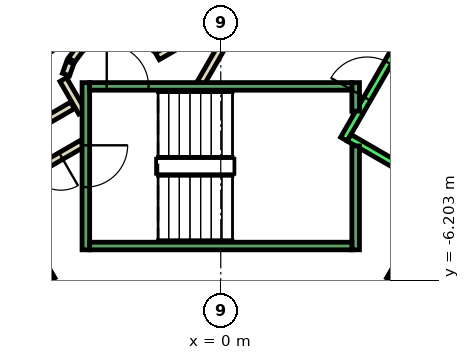
"""IFC4 building model, lengths in metres.
Left out: names, types, materials, properties, quantities, classifications, styles, units other than length and angle.
Written with IfcOpenShell. Run it as: python <this file> out.ifc"""

import sys

from ifc_helpers import new_model, si_unit, direction, frame, frame_2d, origin, place, context, subcontext, project, spatial, rectangle, extrude, element, fill, save


model = new_model("IFC4")
c1 = context("Model", 3, precision=1e-05, world=origin(), true_north=direction((0.0, 1.0)))
c2 = subcontext(c1, "Body", "Model", "MODEL_VIEW")
j1 = project(units=[si_unit("LENGTHUNIT", "METRE"), si_unit("PLANEANGLEUNIT", "RADIAN")], contexts=[c1])
p1 = place(None, origin())
s1 = spatial("IfcSite", under=j1, at=p1, CompositionType="ELEMENT")
p2 = place(p1, origin())
s2 = spatial("IfcBuilding", under=s1, at=p2, CompositionType="ELEMENT")
p3 = place(p2, frame((0.0, 0.0, 15.0)))
s3 = spatial("IfcBuildingStorey", under=s2, at=p3, CompositionType="ELEMENT", Elevation=15.0)
p4 = place(p3, frame((-3.9, -1.599, 0.0), z_axis=(0.0, 0.0, 1.0), x_axis=(-0.865969445389, -0.500096910261, 0.0)))
e1 = element("IfcWall", 1, at=p4, inside=s3, PredefinedType="PARTITIONING", context=c2, shape_type="SweptSolid", body=[
    extrude(rectangle(XDim=1.373, YDim=0.2, at=frame_2d((0.687, 0.0))), origin(), (0.0, 0.0, 1.0), 4.55),
])
p5 = place(p3, frame((-4.145, -0.92, 0.0), z_axis=(0.0, 0.0, 1.0), x_axis=(0.499743786207, -0.866173278362, 0.0)))
e2 = element("IfcWall", 2, at=p5, inside=s3, PredefinedType="PARTITIONING", context=c2, shape_type="SweptSolid", body=[
    extrude(rectangle(XDim=0.991, YDim=0.2, at=frame_2d((0.495, 0.0))), origin(), (0.0, 0.0, 1.0), 4.55),
])
p6 = place(p3, frame((-3.65, -2.61, 0.0), z_axis=(0.0, 0.0, 1.0), x_axis=(-0.866072462134, -0.499918483688, 0.0)))
e3 = element("IfcWall", 3, at=p6, inside=s3, PredefinedType="PARTITIONING", context=c2, shape_type="SweptSolid", body=[
    extrude(rectangle(XDim=2.084, YDim=0.2, at=frame_2d((1.042, 0.0))), origin(), (0.0, 0.0, 1.0), 4.55),
])
p7 = place(p6, frame((0.642, 0.0, 0.0)))
e4 = element("IfcOpeningElement", 4, at=p7, cuts=e3, PredefinedType="OPENING", context=c2, shape_type="SweptSolid", body=[
    extrude(rectangle(XDim=0.9, YDim=2.1, at=frame_2d((0.45, 1.05))), frame((0.0, 0.11, 0.0), z_axis=(0.0, -1.0, 0.0), x_axis=(1.0, 0.0, 0.0)), (0.0, 0.0, 1.0), 0.22),
])
p8 = place(p3, frame((-0.52, -1.0, 0.0), z_axis=(0.0, 0.0, 1.0), x_axis=(0.50011622646, 0.865958290007, 0.0)))
e5 = element("IfcWall", 5, at=p8, inside=s3, PredefinedType="PARTITIONING", context=c2, shape_type="SweptSolid", body=[
    extrude(rectangle(XDim=4.991, YDim=0.2, at=frame_2d((2.496, 0.0))), origin(), (0.0, 0.0, 1.0), 4.55),
])
p9 = place(p8, frame((1.945, 0.0, 0.0)))
e6 = element("IfcOpeningElement", 6, at=p9, cuts=e5, PredefinedType="OPENING", context=c2, shape_type="SweptSolid", body=[
    extrude(rectangle(XDim=1.0, YDim=2.1, at=frame_2d((0.5, 1.05))), frame((0.0, 0.11, 0.0), z_axis=(0.0, -1.0, 0.0), x_axis=(1.0, 0.0, 0.0)), (0.0, 0.0, 1.0), 0.22),
])
p10 = place(p3, frame((-0.412, 0.414, 0.0), z_axis=(0.0, 0.0, 1.0), x_axis=(-0.866017369001, -0.500013916395, 0.0)))
e7 = element("IfcWall", 7, at=p10, inside=s3, PredefinedType="PARTITIONING", context=c2, shape_type="SweptSolid", body=[
    extrude(rectangle(XDim=1.45, YDim=0.2, at=frame_2d((0.725, 0.0))), origin(), (0.0, 0.0, 1.0), 4.55),
])
p11 = place(p3, frame((-3.723, -0.131, 0.0), z_axis=(0.0, 0.0, 1.0), x_axis=(-0.594675113454, -0.803966112121, 0.0)))
e8 = element("IfcWall", 8, at=p11, inside=s3, PredefinedType="PARTITIONING", context=c2, shape_type="SweptSolid", body=[
    extrude(rectangle(XDim=0.338, YDim=0.2, at=frame_2d((0.169, 0.0))), origin(), (0.0, 0.0, 1.0), 4.55),
])
p12 = place(p3, frame((-3.96, -0.47, 0.0), z_axis=(0.0, 0.0, 1.0), x_axis=(-0.334824194261, -0.942280615813, 0.0)))
e9 = element("IfcWall", 9, at=p12, inside=s3, PredefinedType="PARTITIONING", context=c2, shape_type="SweptSolid", body=[
    extrude(rectangle(XDim=0.338, YDim=0.2, at=frame_2d((0.169, 0.0))), origin(), (0.0, 0.0, 1.0), 4.55),
])
p13 = place(p3, frame((-9.751, 2.99, 0.0), z_axis=(0.0, 0.0, 1.0), x_axis=(0.50000090737, -0.866024879913, 0.0)))
e10 = element("IfcWall", 10, at=p13, inside=s3, PredefinedType="STANDARD", context=c2, shape_type="SweptSolid", body=[
    extrude(rectangle(XDim=10.6, YDim=0.2, at=frame_2d((5.3, 0.0))), origin(), (0.0, 0.0, 1.0), 4.55),
])
p14 = place(p3, frame((3.24, -2.488, 0.0), z_axis=(0.0, 0.0, 1.0), x_axis=(0.49994636267, 0.866056369097, 0.0)))
e11 = element("IfcWall", 11, at=p14, inside=s3, PredefinedType="STANDARD", context=c2, shape_type="SweptSolid", body=[
    extrude(rectangle(XDim=2.8, YDim=0.2, at=frame_2d((1.4, 0.0))), origin(), (0.0, 0.0, 1.0), 4.55),
])
p15 = place(p14, frame((1.225, 0.0, 0.0)))
e12 = element("IfcOpeningElement", 12, at=p15, cuts=e11, PredefinedType="OPENING", context=c2, shape_type="SweptSolid", body=[
    extrude(rectangle(XDim=1.1, YDim=2.1, at=frame_2d((0.55, 1.05))), frame((0.0, 0.11, 0.0), z_axis=(0.0, -1.0, 0.0), x_axis=(1.0, 0.0, 0.0)), (0.0, 0.0, 1.0), 0.22),
])
p16 = place(p3, frame((3.377, -2.452, 0.0), z_axis=(0.0, 0.0, 1.0), x_axis=(0.865955154139, -0.50012165622, 0.0)))
e13 = element("IfcWall", 13, at=p16, inside=s3, PredefinedType="STANDARD", context=c2, shape_type="SweptSolid", body=[
    extrude(rectangle(XDim=2.4, YDim=0.2, at=frame_2d((1.2, 0.0))), origin(), (0.0, 0.0, 1.0), 4.55),
])
p17 = place(p3, frame((4.451, -6.19, 0.0), z_axis=(0.0, 0.0, 1.0), x_axis=(0.50000090737, 0.866024879913, 0.0)))
e14 = element("IfcWall", 14, at=p17, inside=s3, PredefinedType="STANDARD", context=c2, shape_type="SweptSolid", body=[
    extrude(rectangle(XDim=10.6, YDim=0.2, at=frame_2d((5.3, 0.0))), origin(), (0.0, 0.0, 1.0), 4.55),
])
p18 = place(p3, frame((-3.55, -1.0, 0.0), z_axis=(0.0, 0.0, 1.0), x_axis=(0.0, -1.0, 0.0)))
e15 = element("IfcWall", 15, at=p18, inside=s3, PredefinedType="STANDARD", context=c2, shape_type="SweptSolid", body=[
    extrude(rectangle(XDim=4.4, YDim=0.2, at=frame_2d((2.2, 0.0))), origin(), (0.0, 0.0, 1.0), 4.55),
])
p19 = place(p18, frame((1.65, 0.0, 0.0)))
e16 = element("IfcOpeningElement", 16, at=p19, cuts=e15, PredefinedType="OPENING", context=c2, shape_type="SweptSolid", body=[
    extrude(rectangle(XDim=1.1, YDim=2.2, at=frame_2d((0.55, 1.1))), frame((0.0, 0.11, 0.0), z_axis=(0.0, -1.0, 0.0), x_axis=(1.0, 0.0, 0.0)), (0.0, 0.0, 1.0), 0.22),
])
p20 = place(p3, frame((3.55, -2.667, 0.0), z_axis=(0.0, 0.0, 1.0), x_axis=(0.0, -1.0, 0.0)))
e17 = element("IfcWall", 17, at=p20, inside=s3, PredefinedType="STANDARD", context=c2, shape_type="SweptSolid", body=[
    extrude(rectangle(XDim=2.733, YDim=0.2, at=frame_2d((1.366, 0.0))), origin(), (0.0, 0.0, 1.0), 4.55),
])
p21 = place(p3, frame((3.55, -1.0, 0.0), z_axis=(0.0, 0.0, 1.0), x_axis=(0.0, -1.0, 0.0)))
e18 = element("IfcWall", 18, at=p21, inside=s3, PredefinedType="STANDARD", context=c2, shape_type="SweptSolid", body=[
    extrude(rectangle(XDim=0.751, YDim=0.2, at=frame_2d((0.375, 0.0))), origin(), (0.0, 0.0, 1.0), 4.55),
])
p22 = place(p3, frame((-3.45, -1.1, 0.0), z_axis=(0.0, 0.0, 1.0), x_axis=(1.0, 0.0, 0.0)))
e19 = element("IfcWall", 19, at=p22, inside=s3, PredefinedType="STANDARD", context=c2, shape_type="SweptSolid", body=[
    extrude(rectangle(XDim=6.9, YDim=0.2, at=frame_2d((3.45, 0.0))), origin(), (0.0, 0.0, 1.0), 4.55),
])
p23 = place(p22, frame((0.45, 0.0, 0.0)))
e20 = element("IfcOpeningElement", 20, at=p23, cuts=e19, PredefinedType="OPENING", context=c2, shape_type="SweptSolid", body=[
    extrude(rectangle(XDim=1.1, YDim=2.2, at=frame_2d((0.55, 1.1))), frame((0.0, 0.11, 0.0), z_axis=(0.0, -1.0, 0.0), x_axis=(1.0, 0.0, 0.0)), (0.0, 0.0, 1.0), 0.22),
])
p24 = place(p3, frame((-3.45, -5.3, 0.0), z_axis=(0.0, 0.0, 1.0), x_axis=(1.0, 0.0, 0.0)))
e21 = element("IfcWall", 21, at=p24, inside=s3, PredefinedType="STANDARD", context=c2, shape_type="SweptSolid", body=[
    extrude(rectangle(XDim=6.9, YDim=0.2, at=frame_2d((3.45, 0.0))), origin(), (0.0, 0.0, 1.0), 4.55),
])
p25 = place(p7, origin())
e22 = element("IfcDoor", 22, at=p25, inside=s3, OperationType="SINGLE_SWING_LEFT", PredefinedType="DOOR", context=c2, shape_type="SweptSolid", body=[
    extrude(rectangle(XDim=0.9, YDim=2.1, at=frame_2d((0.45, 1.05))), frame((0.0, 0.025, 0.0), z_axis=(0.0, -1.0, 0.0), x_axis=(1.0, 0.0, 0.0)), (0.0, 0.0, 1.0), 0.05),
])
fill(e4, e22)
p26 = place(p15, origin())
e23 = element("IfcDoor", 23, at=p26, inside=s3, OperationType="SLIDING_TO_LEFT", PredefinedType="DOOR", context=c2, shape_type="SweptSolid", body=[
    extrude(rectangle(XDim=1.1, YDim=2.1, at=frame_2d((0.55, 1.05))), frame((0.0, 0.025, 0.0), z_axis=(0.0, -1.0, 0.0), x_axis=(1.0, 0.0, 0.0)), (0.0, 0.0, 1.0), 0.05),
])
fill(e12, e23)
p27 = place(p23, origin())
e24 = element("IfcDoor", 24, at=p27, inside=s3, OperationType="SINGLE_SWING_LEFT", PredefinedType="DOOR", context=c2, shape_type="SweptSolid", body=[
    extrude(rectangle(XDim=1.1, YDim=2.2, at=frame_2d((0.55, 1.1))), frame((0.0, 0.025, 0.0), z_axis=(0.0, -1.0, 0.0), x_axis=(1.0, 0.0, 0.0)), (0.0, 0.0, 1.0), 0.05),
])
fill(e20, e24)
p28 = place(p19, origin())
e25 = element("IfcDoor", 25, at=p28, inside=s3, OperationType="SINGLE_SWING_LEFT", PredefinedType="DOOR", context=c2, shape_type="SweptSolid", body=[
    extrude(rectangle(XDim=1.1, YDim=2.2, at=frame_2d((0.55, 1.1))), frame((0.0, 0.025, 0.0), z_axis=(0.0, -1.0, 0.0), x_axis=(1.0, 0.0, 0.0)), (0.0, 0.0, 1.0), 0.05),
])
fill(e16, e25)
save(model, sys.argv[1])
